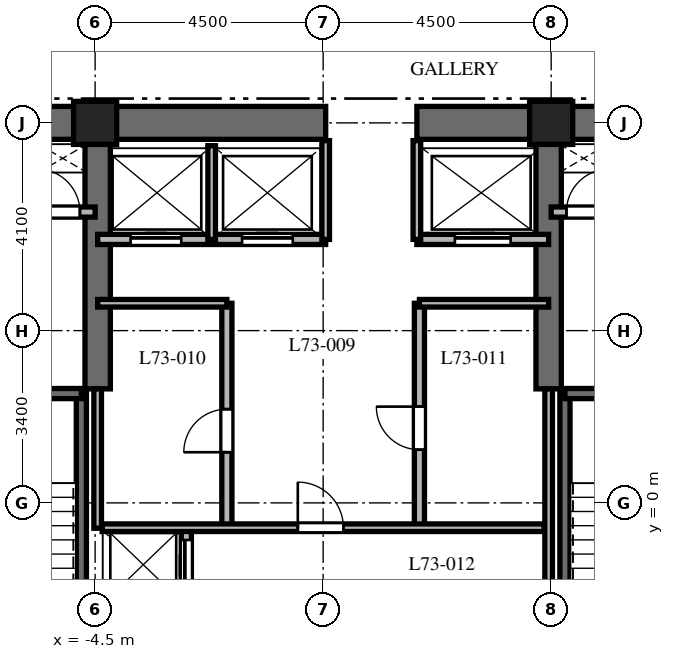
"""IFC4 building model, lengths in metres.
Left out: names, types, materials, properties, quantities, classifications, styles, units other than length and angle.
Written with IfcOpenShell. Run it as: python <this file> out.ifc"""

import sys

from ifc_helpers import new_model, si_unit, direction, frame, frame_2d, origin, origin_2d, place, context, subcontext, project, spatial, rectangle, extrude, element, fill, save


model = new_model("IFC4")
c1 = context("Model", 3, precision=1e-05, world=origin(), true_north=direction((0.0, 1.0)))
c2 = subcontext(c1, "Body", "Model", "MODEL_VIEW")
j1 = project(units=[si_unit("LENGTHUNIT", "METRE"), si_unit("PLANEANGLEUNIT", "RADIAN")], contexts=[c1])
p1 = place(None, origin())
s1 = spatial("IfcSite", under=j1, at=p1, CompositionType="ELEMENT")
p2 = place(p1, origin())
s2 = spatial("IfcBuilding", under=s1, at=p2, CompositionType="ELEMENT")
p3 = place(p2, frame((0.0, 0.0, 293.1)))
s3 = spatial("IfcBuildingStorey", under=s2, at=p3, CompositionType="ELEMENT", Elevation=293.1)
p4 = place(p3, frame((-9.325, 7.5, 0.0), z_axis=(0.0, 0.0, 1.0), x_axis=(1.0, 0.0, 0.0)))
e1 = element("IfcWall", 1, at=p4, inside=s3, PredefinedType="SHEAR", context=c2, shape_type="SweptSolid", body=[
    extrude(rectangle(XDim=9.375, YDim=0.65, at=frame_2d((4.688, 0.0))), origin(), (0.0, 0.0, 1.0), 4.5),
])
p5 = place(p3, frame((1.85, 7.5, 0.0), z_axis=(0.0, 0.0, 1.0), x_axis=(1.0, 0.0, 0.0)))
e2 = element("IfcWall", 2, at=p5, inside=s3, PredefinedType="SHEAR", context=c2, shape_type="SweptSolid", body=[
    extrude(rectangle(XDim=7.475, YDim=0.65, at=frame_2d((3.737, 0.0))), origin(), (0.0, 0.0, 1.0), 4.5),
])
for number, where, z_axis, x_axis in (
    (3, (-4.45, 2.25, 0.0), (0.0, 0.0, 1.0), (0.0, 1.0, 0.0)),
    (4, (4.45, 2.25, 0.0), (0.0, 0.0, 1.0), (0.0, 1.0, 0.0)),
):
    element("IfcWall", number, at=place(p3, frame(where, z_axis=z_axis, x_axis=x_axis)), inside=s3, PredefinedType="SHEAR", context=c2, shape_type="SweptSolid", body=[
        extrude(rectangle(XDim=4.925, YDim=0.5, at=frame_2d((2.462, 0.0))), origin(), (0.0, 0.0, 1.0), 4.5),
    ])
p6 = place(p3, frame((-4.772, -6.985, 0.0), z_axis=(0.0, 0.0, 1.0), x_axis=(0.0, 1.0, 0.0)))
e5 = element("IfcWall", 5, at=p6, inside=s3, PredefinedType="SHEAR", context=c2, shape_type="SweptSolid", body=[
    extrude(rectangle(XDim=9.143, YDim=0.2, at=frame_2d((4.572, 0.0))), origin(), (0.0, 0.0, 1.0), 4.5),
])
p7 = place(p3, frame((-8.458, 2.158, 0.0), z_axis=(0.0, 0.0, 1.0), x_axis=(1.0, 0.0, 0.0)))
e6 = element("IfcWall", 6, at=p7, inside=s3, PredefinedType="SHEAR", context=c2, shape_type="SweptSolid", body=[
    extrude(rectangle(XDim=3.686, YDim=0.2, at=frame_2d((1.843, 0.0))), origin(), (0.0, 0.0, 1.0), 4.5),
])
p8 = place(p7, frame((1.3, 0.0, 0.0)))
e7 = element("IfcOpeningElement", 7, at=p8, cuts=e6, PredefinedType="OPENING", context=c2, shape_type="SweptSolid", body=[
    extrude(rectangle(XDim=1.0, YDim=2.15, at=frame_2d((0.5, 1.075))), frame((0.0, 0.11, 0.0), z_axis=(0.0, -1.0, 0.0), x_axis=(1.0, 0.0, 0.0)), (0.0, 0.0, 1.0), 0.22),
])
p9 = place(p3, frame((4.772, -6.985, 0.0), z_axis=(0.0, 0.0, 1.0), x_axis=(0.0, 1.0, 0.0)))
e8 = element("IfcWall", 8, at=p9, inside=s3, PredefinedType="SHEAR", context=c2, shape_type="SweptSolid", body=[
    extrude(rectangle(XDim=9.143, YDim=0.2, at=frame_2d((4.572, 0.0))), origin(), (0.0, 0.0, 1.0), 4.5),
])
p10 = place(p3, frame((4.772, 2.158, 0.0), z_axis=(0.0, 0.0, 1.0), x_axis=(1.0, 0.0, 0.0)))
e9 = element("IfcWall", 9, at=p10, inside=s3, PredefinedType="SHEAR", context=c2, shape_type="SweptSolid", body=[
    extrude(rectangle(XDim=3.686, YDim=0.2, at=frame_2d((1.843, 0.0))), origin(), (0.0, 0.0, 1.0), 4.5),
])
p11 = place(p10, frame((1.35, 0.0, 0.0)))
e10 = element("IfcOpeningElement", 10, at=p11, cuts=e9, PredefinedType="OPENING", context=c2, shape_type="SweptSolid", body=[
    extrude(rectangle(XDim=1.0, YDim=2.15, at=frame_2d((0.5, 1.075))), frame((0.0, 0.11, 0.0), z_axis=(0.0, -1.0, 0.0), x_axis=(1.0, 0.0, 0.0)), (0.0, 0.0, 1.0), 0.22),
])
for number, where, z_axis, x_axis in (
    (11, (4.5, 7.5, 0.0), (0.0, 0.0, 1.0), (1.0, 0.0, 0.0)),
    (12, (-4.5, 7.5, 0.0), (0.0, 0.0, 1.0), (1.0, 0.0, 0.0)),
):
    element("IfcColumn", number, at=place(p3, frame(where, z_axis=z_axis, x_axis=x_axis)), inside=s3, PredefinedType="COLUMN", context=c2, shape_type="SweptSolid", body=[
        extrude(rectangle(XDim=0.85, YDim=0.85, at=origin_2d()), origin(), (0.0, 0.0, 1.0), 4.5),
    ])
p12 = place(p3, frame((-8.55, 5.74, 0.0), z_axis=(0.0, 0.0, 1.0), x_axis=(1.0, 0.0, 0.0)))
e13 = element("IfcWall", 13, at=p12, inside=s3, PredefinedType="PARTITIONING", context=c2, shape_type="SweptSolid", body=[
    extrude(rectangle(XDim=4.05, YDim=0.2, at=frame_2d((2.025, 0.0))), origin(), (0.0, 0.0, 1.0), 4.18),
])
p13 = place(p12, frame((0.75, 0.0, 0.0)))
e14 = element("IfcOpeningElement", 14, at=p13, cuts=e13, PredefinedType="OPENING", context=c2, shape_type="SweptSolid", body=[
    extrude(rectangle(XDim=1.1, YDim=2.2, at=frame_2d((0.55, 1.1))), frame((0.0, 0.11, 0.0), z_axis=(0.0, -1.0, 0.0), x_axis=(1.0, 0.0, 0.0)), (0.0, 0.0, 1.0), 0.22),
])
p14 = place(p12, frame((2.9, 0.0, 0.0)))
e15 = element("IfcOpeningElement", 15, at=p14, cuts=e13, PredefinedType="OPENING", context=c2, shape_type="SweptSolid", body=[
    extrude(rectangle(XDim=0.85, YDim=2.03, at=frame_2d((0.425, 1.015))), frame((0.0, 0.11, 0.0), z_axis=(0.0, -1.0, 0.0), x_axis=(1.0, 0.0, 0.0)), (0.0, 0.0, 1.0), 0.22),
])
p15 = place(p3, frame((4.5, 5.74, 0.0), z_axis=(0.0, 0.0, 1.0), x_axis=(1.0, 0.0, 0.0)))
e16 = element("IfcWall", 16, at=p15, inside=s3, PredefinedType="PARTITIONING", context=c2, shape_type="SweptSolid", body=[
    extrude(rectangle(XDim=4.05, YDim=0.2, at=frame_2d((2.025, 0.0))), origin(), (0.0, 0.0, 1.0), 4.18),
])
p16 = place(p15, frame((0.3, 0.0, 0.0)))
e17 = element("IfcOpeningElement", 17, at=p16, cuts=e16, PredefinedType="OPENING", context=c2, shape_type="SweptSolid", body=[
    extrude(rectangle(XDim=0.85, YDim=2.03, at=frame_2d((0.425, 1.015))), frame((0.0, 0.11, 0.0), z_axis=(0.0, -1.0, 0.0), x_axis=(1.0, 0.0, 0.0)), (0.0, 0.0, 1.0), 0.22),
])
p17 = place(p15, frame((2.15, 0.0, 0.0)))
e18 = element("IfcOpeningElement", 18, at=p17, cuts=e16, PredefinedType="OPENING", context=c2, shape_type="SweptSolid", body=[
    extrude(rectangle(XDim=1.1, YDim=2.2, at=frame_2d((0.55, 1.1))), frame((0.0, 0.11, 0.0), z_axis=(0.0, -1.0, 0.0), x_axis=(1.0, 0.0, 0.0)), (0.0, 0.0, 1.0), 0.22),
])
p18 = place(p3, frame((-2.7, -1.972, 0.0), z_axis=(0.0, 0.0, 1.0), x_axis=(0.0, 1.0, 0.0)))
e19 = element("IfcWall", 19, at=p18, inside=s3, PredefinedType="PARTITIONING", context=c2, shape_type="SweptSolid", body=[
    extrude(rectangle(XDim=1.472, YDim=0.2, at=frame_2d((0.736, 0.0))), origin(), (0.0, 0.0, 1.0), 4.18),
])
p19 = place(p18, frame((0.24, 0.0, 0.0)))
e20 = element("IfcOpeningElement", 20, at=p19, cuts=e19, PredefinedType="OPENING", context=c2, shape_type="SweptSolid", body=[
    extrude(rectangle(XDim=1.0, YDim=2.2, at=frame_2d((0.5, 1.1))), frame((0.0, 0.11, 0.0), z_axis=(0.0, -1.0, 0.0), x_axis=(1.0, 0.0, 0.0)), (0.0, 0.0, 1.0), 0.22),
])
p20 = place(p3, frame((-4.45, 5.2, 0.0), z_axis=(0.0, 0.0, 1.0), x_axis=(1.0, 0.0, 0.0)))
e21 = element("IfcWall", 21, at=p20, inside=s3, PredefinedType="PARTITIONING", context=c2, shape_type="SweptSolid", body=[
    extrude(rectangle(XDim=4.5, YDim=0.2, at=frame_2d((2.25, 0.0))), origin(), (0.0, 0.0, 1.0), 4.18),
])
p21 = place(p20, frame((0.65, 0.0, 0.0)))
e22 = element("IfcOpeningElement", 22, at=p21, cuts=e21, PredefinedType="OPENING", context=c2, shape_type="SweptSolid", body=[
    extrude(rectangle(XDim=1.0, YDim=2.2, at=frame_2d((0.5, 1.1))), frame((0.0, 0.11, 0.0), z_axis=(0.0, -1.0, 0.0), x_axis=(1.0, 0.0, 0.0)), (0.0, 0.0, 1.0), 0.22),
])
p22 = place(p20, frame((2.85, 0.0, 0.0)))
e23 = element("IfcOpeningElement", 23, at=p22, cuts=e21, PredefinedType="OPENING", context=c2, shape_type="SweptSolid", body=[
    extrude(rectangle(XDim=1.0, YDim=2.2, at=frame_2d((0.5, 1.1))), frame((0.0, 0.11, 0.0), z_axis=(0.0, -1.0, 0.0), x_axis=(1.0, 0.0, 0.0)), (0.0, 0.0, 1.0), 0.22),
])
p23 = place(p3, frame((1.85, 5.2, 0.0), z_axis=(0.0, 0.0, 1.0), x_axis=(1.0, 0.0, 0.0)))
e24 = element("IfcWall", 24, at=p23, inside=s3, PredefinedType="PARTITIONING", context=c2, shape_type="SweptSolid", body=[
    extrude(rectangle(XDim=2.6, YDim=0.2, at=frame_2d((1.3, 0.0))), origin(), (0.0, 0.0, 1.0), 4.18),
])
p24 = place(p23, frame((0.75, 0.0, 0.0)))
e25 = element("IfcOpeningElement", 25, at=p24, cuts=e24, PredefinedType="OPENING", context=c2, shape_type="SweptSolid", body=[
    extrude(rectangle(XDim=1.1, YDim=2.2, at=frame_2d((0.55, 1.1))), frame((0.0, 0.11, 0.0), z_axis=(0.0, -1.0, 0.0), x_axis=(1.0, 0.0, 0.0)), (0.0, 0.0, 1.0), 0.22),
])
p25 = place(p3, frame((-2.2, 5.2, 0.0), z_axis=(0.0, 0.0, 1.0), x_axis=(0.0, 1.0, 0.0)))
e26 = element("IfcWall", 26, at=p25, inside=s3, PredefinedType="PARTITIONING", context=c2, shape_type="SweptSolid", body=[
    extrude(rectangle(XDim=1.85, YDim=0.15, at=frame_2d((0.925, 0.0))), origin(), (0.0, 0.0, 1.0), 4.18),
])
for number, where, z_axis, x_axis in (
    (27, (0.05, 5.2, 0.0), (0.0, 0.0, 1.0), (0.0, 1.0, 0.0)),
    (28, (1.85, 5.2, 0.0), (0.0, 0.0, 1.0), (0.0, 1.0, 0.0)),
):
    element("IfcWall", number, at=place(p3, frame(where, z_axis=z_axis, x_axis=x_axis)), inside=s3, PredefinedType="PARTITIONING", context=c2, shape_type="SweptSolid", body=[
        extrude(rectangle(XDim=1.95, YDim=0.15, at=frame_2d((0.975, 0.0))), origin(), (0.0, 0.0, 1.0), 4.18),
    ])
p26 = place(p3, frame((-4.45, -0.5, 0.0), z_axis=(0.0, 0.0, 1.0), x_axis=(0.0, 1.0, 0.0)))
e29 = element("IfcWall", 29, at=p26, inside=s3, PredefinedType="PARTITIONING", context=c2, shape_type="SweptSolid", body=[
    extrude(rectangle(XDim=2.75, YDim=0.15, at=frame_2d((1.375, 0.0))), origin(), (0.0, 0.0, 1.0), 4.18),
])
p27 = place(p3, frame((4.45, -1.972, 0.0), z_axis=(0.0, 0.0, 1.0), x_axis=(0.0, 1.0, 0.0)))
e30 = element("IfcWall", 30, at=p27, inside=s3, PredefinedType="PARTITIONING", context=c2, shape_type="SweptSolid", body=[
    extrude(rectangle(XDim=4.222, YDim=0.15, at=frame_2d((2.111, 0.0))), origin(), (0.0, 0.0, 1.0), 4.18),
])
p28 = place(p3, frame((-1.9, -0.5, 0.0), z_axis=(0.0, 0.0, 1.0), x_axis=(0.0, 1.0, 0.0)))
e31 = element("IfcWall", 31, at=p28, inside=s3, PredefinedType="PARTITIONING", context=c2, shape_type="SweptSolid", body=[
    extrude(rectangle(XDim=4.44, YDim=0.2, at=frame_2d((2.22, 0.0))), origin(), (0.0, 0.0, 1.0), 4.18),
])
p29 = place(p28, frame((1.5, 0.0, 0.0)))
e32 = element("IfcOpeningElement", 32, at=p29, cuts=e31, PredefinedType="OPENING", context=c2, shape_type="SweptSolid", body=[
    extrude(rectangle(XDim=0.85, YDim=2.03, at=frame_2d((0.425, 1.015))), frame((0.0, 0.11, 0.0), z_axis=(0.0, -1.0, 0.0), x_axis=(1.0, 0.0, 0.0)), (0.0, 0.0, 1.0), 0.22),
])
p30 = place(p3, frame((-4.45, 3.94, 0.0), z_axis=(0.0, 0.0, 1.0), x_axis=(1.0, 0.0, 0.0)))
e33 = element("IfcWall", 33, at=p30, inside=s3, PredefinedType="PARTITIONING", context=c2, shape_type="SweptSolid", body=[
    extrude(rectangle(XDim=2.55, YDim=0.15, at=frame_2d((1.275, 0.0))), origin(), (0.0, 0.0, 1.0), 4.18),
])
p31 = place(p3, frame((1.9, -0.5, 0.0), z_axis=(0.0, 0.0, 1.0), x_axis=(0.0, 1.0, 0.0)))
e34 = element("IfcWall", 34, at=p31, inside=s3, PredefinedType="PARTITIONING", context=c2, shape_type="SweptSolid", body=[
    extrude(rectangle(XDim=4.44, YDim=0.2, at=frame_2d((2.22, 0.0))), origin(), (0.0, 0.0, 1.0), 4.18),
])
p32 = place(p31, frame((1.55, 0.0, 0.0)))
e35 = element("IfcOpeningElement", 35, at=p32, cuts=e34, PredefinedType="OPENING", context=c2, shape_type="SweptSolid", body=[
    extrude(rectangle(XDim=0.85, YDim=2.03, at=frame_2d((0.425, 1.015))), frame((0.0, 0.11, 0.0), z_axis=(0.0, -1.0, 0.0), x_axis=(1.0, 0.0, 0.0)), (0.0, 0.0, 1.0), 0.22),
])
p33 = place(p3, frame((1.9, 3.94, 0.0), z_axis=(0.0, 0.0, 1.0), x_axis=(1.0, 0.0, 0.0)))
e36 = element("IfcWall", 36, at=p33, inside=s3, PredefinedType="PARTITIONING", context=c2, shape_type="SweptSolid", body=[
    extrude(rectangle(XDim=2.55, YDim=0.15, at=frame_2d((1.275, 0.0))), origin(), (0.0, 0.0, 1.0), 4.18),
])
p34 = place(p3, frame((-4.36, -0.49, 0.0), z_axis=(0.0, 0.0, 1.0), x_axis=(1.0, 0.0, 0.0)))
e37 = element("IfcWall", 37, at=p34, inside=s3, PredefinedType="PARTITIONING", context=c2, shape_type="SweptSolid", body=[
    extrude(rectangle(XDim=8.72, YDim=0.15, at=frame_2d((4.36, 0.0))), origin(), (0.0, 0.0, 1.0), 4.18),
])
p35 = place(p34, frame((3.86, 0.0, 0.0)))
e38 = element("IfcOpeningElement", 38, at=p35, cuts=e37, PredefinedType="OPENING", context=c2, shape_type="SweptSolid", body=[
    extrude(rectangle(XDim=0.9, YDim=2.03, at=frame_2d((0.45, 1.015))), frame((0.0, 0.085, 0.0), z_axis=(0.0, -1.0, 0.0), x_axis=(1.0, 0.0, 0.0)), (0.0, 0.0, 1.0), 0.17),
])
p36 = place(p14, origin())
e39 = element("IfcDoor", 39, at=p36, inside=s3, OperationType="SINGLE_SWING_LEFT", PredefinedType="DOOR", context=c2, shape_type="SweptSolid", body=[
    extrude(rectangle(XDim=0.85, YDim=2.03, at=frame_2d((0.425, 1.015))), frame((0.0, 0.025, 0.0), z_axis=(0.0, -1.0, 0.0), x_axis=(1.0, 0.0, 0.0)), (0.0, 0.0, 1.0), 0.05),
])
fill(e15, e39)
p37 = place(p16, origin())
e40 = element("IfcDoor", 40, at=p37, inside=s3, OperationType="SINGLE_SWING_RIGHT", PredefinedType="DOOR", context=c2, shape_type="SweptSolid", body=[
    extrude(rectangle(XDim=0.85, YDim=2.03, at=frame_2d((0.425, 1.015))), frame((0.0, 0.025, 0.0), z_axis=(0.0, -1.0, 0.0), x_axis=(1.0, 0.0, 0.0)), (0.0, 0.0, 1.0), 0.05),
])
fill(e17, e40)
p38 = place(p19, origin())
e41 = element("IfcDoor", 41, at=p38, inside=s3, OperationType="SLIDING_TO_LEFT", PredefinedType="DOOR", context=c2, shape_type="SweptSolid", body=[
    extrude(rectangle(XDim=1.0, YDim=2.2, at=frame_2d((0.5, 1.1))), frame((0.0, 0.025, 0.0), z_axis=(0.0, -1.0, 0.0), x_axis=(1.0, 0.0, 0.0)), (0.0, 0.0, 1.0), 0.05),
])
fill(e20, e41)
p39 = place(p21, origin())
e42 = element("IfcDoor", 42, at=p39, inside=s3, OperationType="SLIDING_TO_LEFT", PredefinedType="DOOR", context=c2, shape_type="SweptSolid", body=[
    extrude(rectangle(XDim=1.0, YDim=2.2, at=frame_2d((0.5, 1.1))), frame((0.0, 0.025, 0.0), z_axis=(0.0, -1.0, 0.0), x_axis=(1.0, 0.0, 0.0)), (0.0, 0.0, 1.0), 0.05),
])
fill(e22, e42)
p40 = place(p22, origin())
e43 = element("IfcDoor", 43, at=p40, inside=s3, OperationType="SLIDING_TO_RIGHT", PredefinedType="DOOR", context=c2, shape_type="SweptSolid", body=[
    extrude(rectangle(XDim=1.0, YDim=2.2, at=frame_2d((0.5, 1.1))), frame((0.0, 0.025, 0.0), z_axis=(0.0, -1.0, 0.0), x_axis=(1.0, 0.0, 0.0)), (0.0, 0.0, 1.0), 0.05),
])
fill(e23, e43)
p41 = place(p24, origin())
e44 = element("IfcDoor", 44, at=p41, inside=s3, OperationType="SLIDING_TO_RIGHT", PredefinedType="DOOR", context=c2, shape_type="SweptSolid", body=[
    extrude(rectangle(XDim=1.1, YDim=2.2, at=frame_2d((0.55, 1.1))), frame((0.0, 0.025, 0.0), z_axis=(0.0, -1.0, 0.0), x_axis=(1.0, 0.0, 0.0)), (0.0, 0.0, 1.0), 0.05),
])
fill(e25, e44)
p42 = place(p29, origin())
e45 = element("IfcDoor", 45, at=p42, inside=s3, OperationType="SINGLE_SWING_LEFT", PredefinedType="DOOR", context=c2, shape_type="SweptSolid", body=[
    extrude(rectangle(XDim=0.85, YDim=2.03, at=frame_2d((0.425, 1.015))), frame((0.0, 0.025, 0.0), z_axis=(0.0, -1.0, 0.0), x_axis=(1.0, 0.0, 0.0)), (0.0, 0.0, 1.0), 0.05),
])
fill(e32, e45)
p43 = place(p32, origin())
e46 = element("IfcDoor", 46, at=p43, inside=s3, OperationType="SINGLE_SWING_RIGHT", PredefinedType="DOOR", context=c2, shape_type="SweptSolid", body=[
    extrude(rectangle(XDim=0.85, YDim=2.03, at=frame_2d((0.425, 1.015))), frame((0.0, 0.025, 0.0), z_axis=(0.0, -1.0, 0.0), x_axis=(1.0, 0.0, 0.0)), (0.0, 0.0, 1.0), 0.05),
])
fill(e35, e46)
p44 = place(p35, origin())
e47 = element("IfcDoor", 47, at=p44, inside=s3, OperationType="SINGLE_SWING_LEFT", PredefinedType="DOOR", context=c2, shape_type="SweptSolid", body=[
    extrude(rectangle(XDim=0.9, YDim=2.03, at=frame_2d((0.45, 1.015))), frame((0.0, 0.025, 0.0), z_axis=(0.0, -1.0, 0.0), x_axis=(1.0, 0.0, 0.0)), (0.0, 0.0, 1.0), 0.05),
])
fill(e38, e47)
save(model, sys.argv[1])
